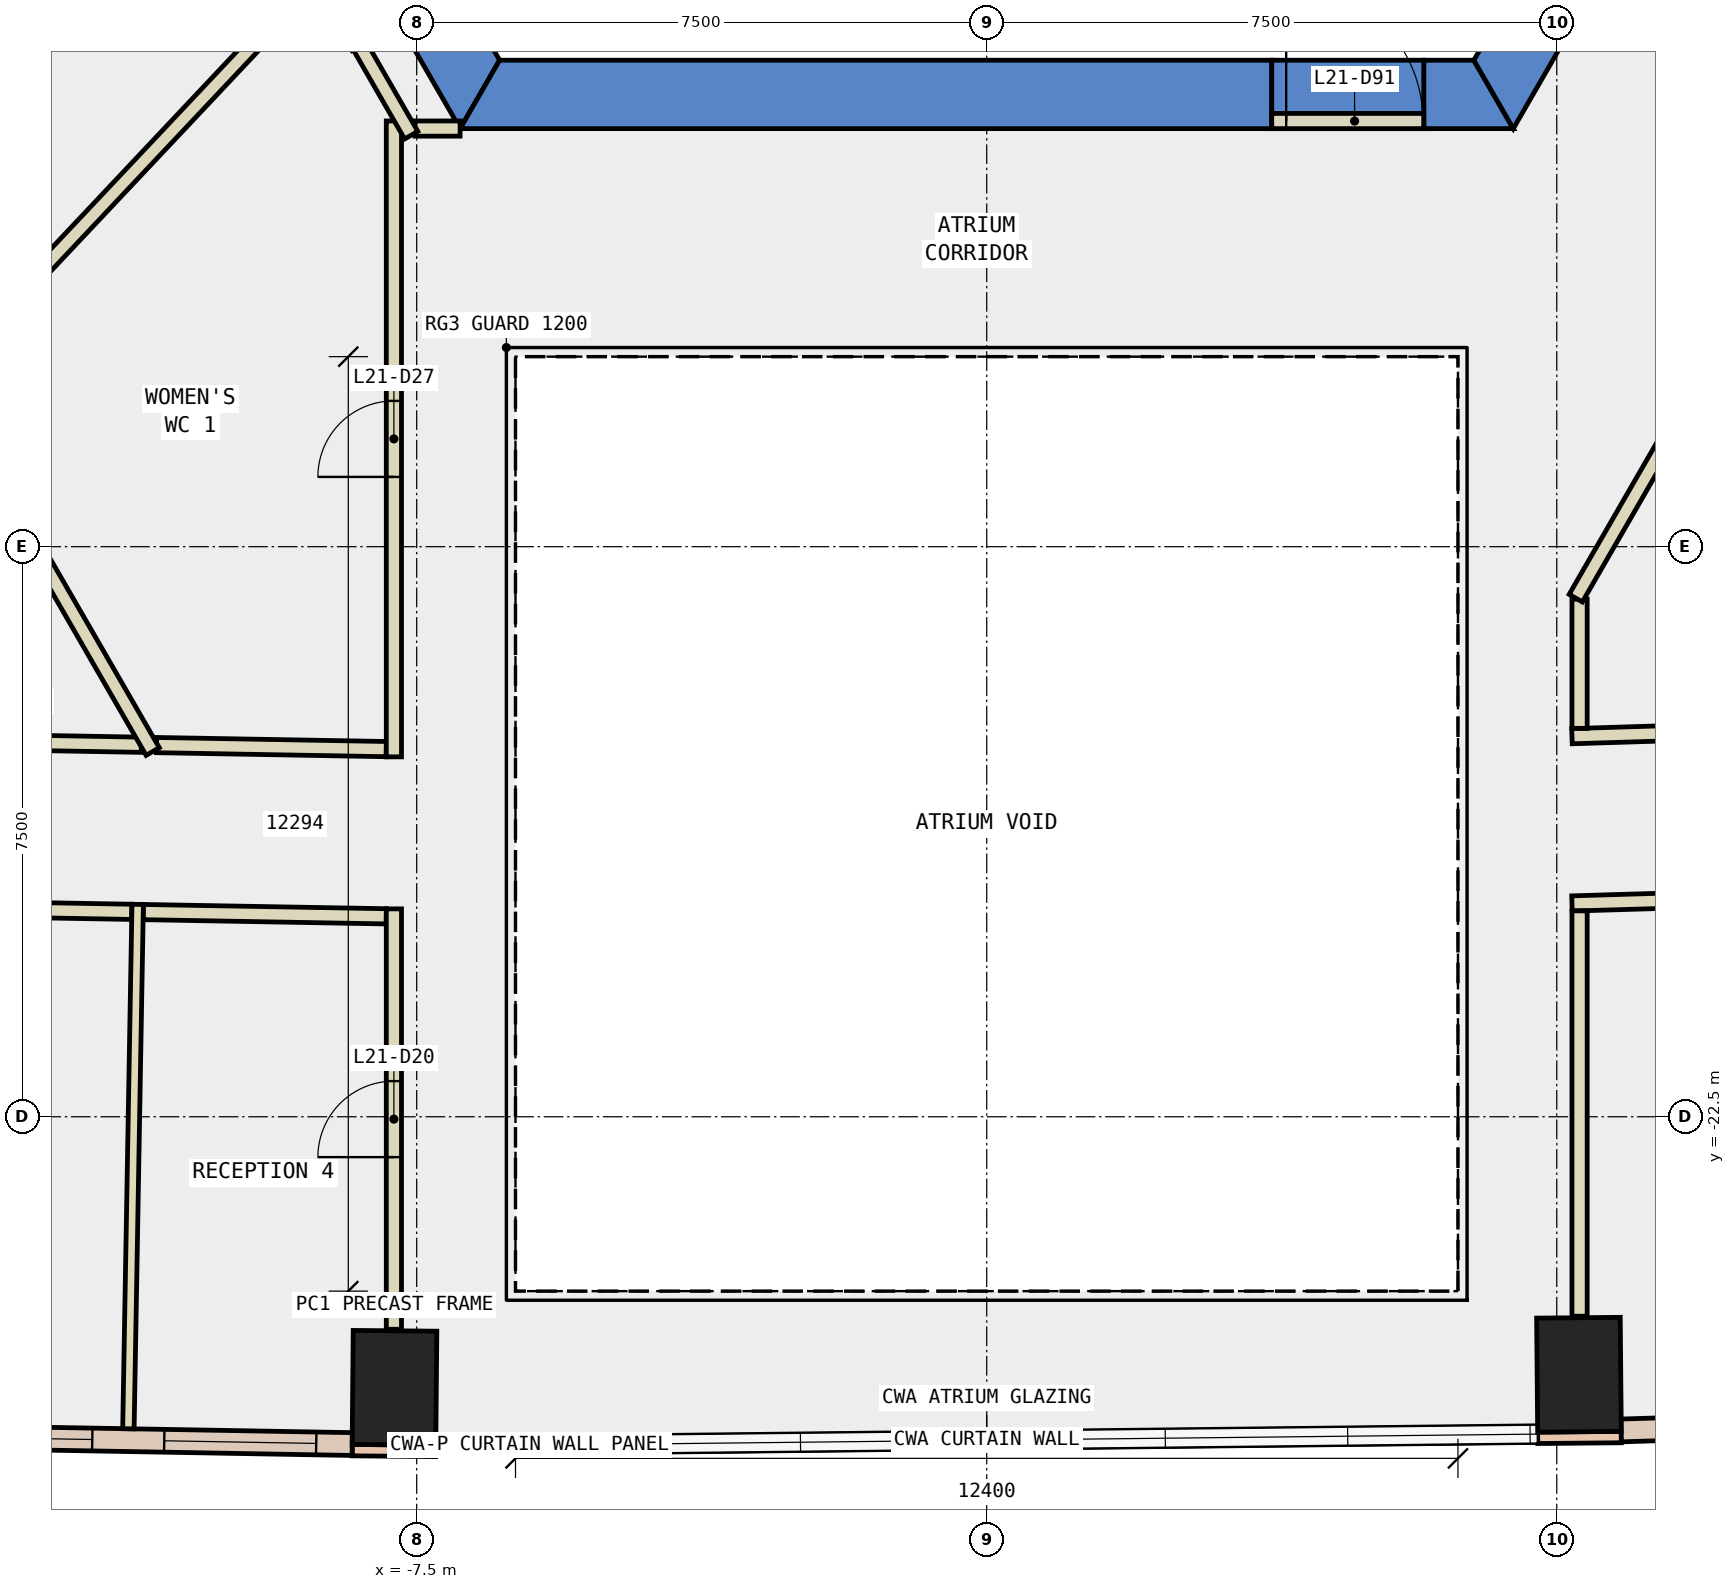
"""IFC4 building model, lengths in metres.
Left out: names, types, materials, properties, quantities, classifications, styles, units other than length and angle.
Written with IfcOpenShell. Run it as: python <this file> out.ifc"""

import sys

from ifc_helpers import new_model, si_unit, direction, frame, frame_2d, origin, origin_2d, place, context, subcontext, project, spatial, polyline, rectangle, outline, extrude, element, fill, save


model = new_model("IFC4")
c1 = context("Model", 3, precision=1e-05, world=origin(), true_north=direction((0.0, 1.0)))
c2 = subcontext(c1, "Body", "Model", "MODEL_VIEW")
j1 = project(units=[si_unit("LENGTHUNIT", "METRE"), si_unit("PLANEANGLEUNIT", "RADIAN")], contexts=[c1])
p1 = place(None, origin())
s1 = spatial("IfcSite", under=j1, at=p1, CompositionType="ELEMENT")
p2 = place(p1, origin())
s2 = spatial("IfcBuilding", under=s1, at=p2, CompositionType="ELEMENT")
p3 = place(p2, frame((0.0, 0.0, 99.2)))
s3 = spatial("IfcBuildingStorey", under=s2, at=p3, CompositionType="ELEMENT", Elevation=99.2)
for number, where, z_axis, x_axis in (
    (1, (-7.792, -26.066, -0.4), (0.0, 0.0, 1.0), (-1.0, 0.009, 0.0)),
    (2, (7.792, -25.894, -0.4), (0.0, 0.0, 1.0), (1.0, 0.009, 0.0)),
):
    element("IfcColumn", number, at=place(p3, frame(where, z_axis=z_axis, x_axis=x_axis)), inside=s3, PredefinedType="COLUMN", context=c2, shape_type="SweptSolid", body=[
        extrude(rectangle(XDim=1.1, YDim=1.5, at=origin_2d()), origin(), (0.0, 0.0, 1.0), 4.2),
    ])
p4 = place(p3, frame((0.0, 0.0, -0.4)))
e3 = element("IfcWall", 3, at=p4, inside=s3, PredefinedType="SHEAR", context=c2, shape_type="SweptSolid", body=[
    extrude(outline(polyline([(-13.856, 2.5), (-6.928, -9.5), (-6.409, -8.6), (-12.817, 2.5), (-13.856, 2.5)])), origin(), (0.0, 0.0, 1.0), 4.2),
])
p5 = place(p3, frame((0.0, 0.0, -0.4)))
e4 = element("IfcWall", 4, at=p5, inside=s3, PredefinedType="SHEAR", context=c2, shape_type="SweptSolid", body=[
    extrude(outline(polyline([(3.75, -9.5), (3.75, -8.6), (-6.409, -8.6), (-6.928, -9.5), (3.75, -9.5)])), origin(), (0.0, 0.0, 1.0), 4.2),
])
p6 = place(p3, frame((0.0, 0.0, -0.4)))
e5 = element("IfcWall", 5, at=p6, inside=s3, PredefinedType="SHEAR", context=c2, shape_type="SweptSolid", body=[
    extrude(outline(polyline([(5.75, -8.6), (5.75, -9.5), (6.928, -9.5), (6.409, -8.6), (5.75, -8.6)])), origin(), (0.0, 0.0, 1.0), 4.2),
])
p7 = place(p3, frame((0.0, 0.0, 3.6)))
e6 = element("IfcWall", 6, at=p7, inside=s3, PredefinedType="SHEAR", context=c2, shape_type="SweptSolid", body=[
    extrude(outline(polyline([(5.75, -9.5), (5.75, -8.6), (3.75, -8.6), (3.75, -9.5), (5.75, -9.5)])), origin(), (0.0, 0.0, 1.0), 0.2),
])
p8 = place(p3, frame((0.0, 0.0, -0.4)))
e7 = element("IfcWall", 7, at=p8, inside=s3, PredefinedType="SHEAR", context=c2, shape_type="SweptSolid", body=[
    extrude(outline(polyline([(8.117, -7.44), (7.338, -6.99), (6.409, -8.6), (6.928, -9.5), (8.117, -7.44)])), origin(), (0.0, 0.0, 1.0), 4.2),
])
p9 = place(p3, frame((-9.31, -5.375, -0.4), z_axis=(0.0, 0.0, 1.0), x_axis=(-0.866017533419, -0.500013631625, 0.0)))
e8 = element("IfcWall", 8, at=p9, inside=s3, PredefinedType="SHEAR", context=c2, shape_type="SweptSolid", body=[
    extrude(rectangle(XDim=9.0, YDim=0.8, at=frame_2d((4.5, 0.0))), origin(), (0.0, 0.0, 1.0), 4.2),
])
for number, where, z_axis, x_axis in (
    (9, (-8.349, -26.886, 0.0), (0.0, 0.0, 1.0), (1.0, -0.009, 0.0)),
    (10, (7.249, -26.724, 0.0), (0.0, 0.0, 1.0), (1.0, 0.009, 0.0)),
):
    element("IfcWall", number, at=place(p3, frame(where, z_axis=z_axis, x_axis=x_axis)), inside=s3, PredefinedType="STANDARD", context=c2, shape_type="SweptSolid", body=[
        extrude(rectangle(XDim=1.1, YDim=0.15, at=frame_2d((0.55, 0.0))), origin(), (0.0, 0.0, 1.0), 3.8),
    ])
p10 = place(p3, frame((-14.242, -26.703, 0.0), z_axis=(0.0, 0.0, 1.0), x_axis=(0.999847261365, -0.017477240672, 0.0)))
e11 = element("IfcWall", 11, at=p10, inside=s3, PredefinedType="STANDARD", context=c2, shape_type="SweptSolid", body=[
    extrude(rectangle(XDim=5.895, YDim=0.3, at=frame_2d((2.948, 0.0))), origin(), (0.0, 0.0, 1.0), 3.8),
])
p11 = place(p10, frame((0.474, 0.0, 0.9)))
e12 = element("IfcOpeningElement", 12, at=p11, cuts=e11, PredefinedType="OPENING", context=c2, shape_type="SweptSolid", body=[
    extrude(rectangle(XDim=2.0, YDim=2.6, at=frame_2d((1.0, 1.3))), frame((0.0, 0.16, 0.0), z_axis=(0.0, -1.0, 0.0), x_axis=(1.0, 0.0, 0.0)), (0.0, 0.0, 1.0), 0.32),
])
p12 = place(p10, frame((3.421, 0.0, 0.9)))
e13 = element("IfcOpeningElement", 13, at=p12, cuts=e11, PredefinedType="OPENING", context=c2, shape_type="SweptSolid", body=[
    extrude(rectangle(XDim=2.0, YDim=2.6, at=frame_2d((1.0, 1.3))), frame((0.0, 0.16, 0.0), z_axis=(0.0, -1.0, 0.0), x_axis=(1.0, 0.0, 0.0)), (0.0, 0.0, 1.0), 0.32),
])
p13 = place(p3, frame((8.347, -26.627, 0.0), z_axis=(0.0, 0.0, 1.0), x_axis=(0.999529601824, 0.030668796478, 0.0)))
e14 = element("IfcWall", 14, at=p13, inside=s3, PredefinedType="STANDARD", context=c2, shape_type="SweptSolid", body=[
    extrude(rectangle(XDim=5.899, YDim=0.3, at=frame_2d((2.949, 0.0))), origin(), (0.0, 0.0, 1.0), 3.8),
])
p14 = place(p13, frame((0.475, 0.0, 0.9)))
e15 = element("IfcOpeningElement", 15, at=p14, cuts=e14, PredefinedType="OPENING", context=c2, shape_type="SweptSolid", body=[
    extrude(rectangle(XDim=2.0, YDim=2.6, at=frame_2d((1.0, 1.3))), frame((0.0, 0.16, 0.0), z_axis=(0.0, -1.0, 0.0), x_axis=(1.0, 0.0, 0.0)), (0.0, 0.0, 1.0), 0.32),
])
p15 = place(p13, frame((3.424, 0.0, 0.9)))
e16 = element("IfcOpeningElement", 16, at=p15, cuts=e14, PredefinedType="OPENING", context=c2, shape_type="SweptSolid", body=[
    extrude(rectangle(XDim=2.0, YDim=2.6, at=frame_2d((1.0, 1.3))), frame((0.0, 0.16, 0.0), z_axis=(0.0, -1.0, 0.0), x_axis=(1.0, 0.0, 0.0)), (0.0, 0.0, 1.0), 0.32),
])
p16 = place(p3, frame((7.7, -17.493, 0.0), z_axis=(0.0, 0.0, 1.0), x_axis=(0.999526319751, 0.030775576778, 0.0)))
e17 = element("IfcWall", 17, at=p16, inside=s3, PredefinedType="PARTITIONING", context=c2, shape_type="SweptSolid", body=[
    extrude(rectangle(XDim=6.822, YDim=0.2, at=frame_2d((3.411, 0.0))), origin(), (0.0, 0.0, 1.0), 3.8),
])
p17 = place(p16, frame((2.911, 0.0, 0.0)))
e18 = element("IfcOpeningElement", 18, at=p17, cuts=e17, PredefinedType="OPENING", context=c2, shape_type="SweptSolid", body=[
    extrude(rectangle(XDim=1.0, YDim=2.1, at=frame_2d((0.5, 1.05))), frame((0.0, 0.11, 0.0), z_axis=(0.0, -1.0, 0.0), x_axis=(1.0, 0.0, 0.0)), (0.0, 0.0, 1.0), 0.22),
])
p18 = place(p3, frame((-10.923, -17.61, 0.0), z_axis=(0.0, 0.0, 1.0), x_axis=(0.999846489632, -0.017521334753, 0.0)))
e19 = element("IfcWall", 19, at=p18, inside=s3, PredefinedType="PARTITIONING", context=c2, shape_type="SweptSolid", body=[
    extrude(rectangle(XDim=3.024, YDim=0.2, at=frame_2d((1.512, 0.0))), origin(), (0.0, 0.0, 1.0), 3.8),
])
p19 = place(p3, frame((-14.58, -17.545, 0.0), z_axis=(0.0, 0.0, 1.0), x_axis=(0.999844180431, -0.01765261618, 0.0)))
e20 = element("IfcWall", 20, at=p19, inside=s3, PredefinedType="PARTITIONING", context=c2, shape_type="SweptSolid", body=[
    extrude(rectangle(XDim=3.458, YDim=0.2, at=frame_2d((1.729, 0.0))), origin(), (0.0, 0.0, 1.0), 3.8),
])
p20 = place(p19, frame((1.229, 0.0, 0.0)))
e21 = element("IfcOpeningElement", 21, at=p20, cuts=e20, PredefinedType="OPENING", context=c2, shape_type="SweptSolid", body=[
    extrude(rectangle(XDim=1.0, YDim=2.1, at=frame_2d((0.5, 1.05))), frame((0.0, 0.11, 0.0), z_axis=(0.0, -1.0, 0.0), x_axis=(1.0, 0.0, 0.0)), (0.0, 0.0, 1.0), 0.22),
])
p21 = place(p3, frame((21.621, -19.28, 0.0), z_axis=(0.0, 0.0, 1.0), x_axis=(-0.999557957525, -0.029730280001, 0.0)))
e22 = element("IfcWall", 22, at=p21, inside=s3, PredefinedType="PARTITIONING", context=c2, shape_type="SweptSolid", body=[
    extrude(rectangle(XDim=13.927, YDim=0.2, at=frame_2d((6.964, 0.0))), origin(), (0.0, 0.0, 1.0), 3.8),
])
p22 = place(p21, frame((6.464, 0.0, 0.0)))
e23 = element("IfcOpeningElement", 23, at=p22, cuts=e22, PredefinedType="OPENING", context=c2, shape_type="SweptSolid", body=[
    extrude(rectangle(XDim=1.0, YDim=2.1, at=frame_2d((0.5, 1.05))), frame((0.0, 0.11, 0.0), z_axis=(0.0, -1.0, 0.0), x_axis=(1.0, 0.0, 0.0)), (0.0, 0.0, 1.0), 0.22),
])
p23 = place(p3, frame((-11.248, -19.804, 0.0), z_axis=(0.0, 0.0, 1.0), x_axis=(-0.999848794654, 0.017389302123, 0.0)))
e24 = element("IfcWall", 24, at=p23, inside=s3, PredefinedType="PARTITIONING", context=c2, shape_type="SweptSolid", body=[
    extrude(rectangle(XDim=3.384, YDim=0.2, at=frame_2d((1.692, 0.0))), origin(), (0.0, 0.0, 1.0), 3.8),
])
p24 = place(p3, frame((-7.9, -19.863, 0.0), z_axis=(0.0, 0.0, 1.0), x_axis=(-0.999845883554, 0.017555886191, 0.0)))
e25 = element("IfcWall", 25, at=p24, inside=s3, PredefinedType="PARTITIONING", context=c2, shape_type="SweptSolid", body=[
    extrude(rectangle(XDim=3.198, YDim=0.2, at=frame_2d((1.599, 0.0))), origin(), (0.0, 0.0, 1.0), 3.8),
])
p25 = place(p3, frame((7.8, -15.69, 0.0), z_axis=(0.0, 0.0, 1.0), x_axis=(0.0, -1.0, 0.0)))
e26 = element("IfcWall", 26, at=p25, inside=s3, PredefinedType="PARTITIONING", context=c2, shape_type="SweptSolid", body=[
    extrude(rectangle(XDim=1.7, YDim=0.2, at=frame_2d((0.85, 0.0))), origin(), (0.0, 0.0, 1.0), 3.8),
])
p26 = place(p3, frame((-7.522, -9.499, 0.0), z_axis=(0.0, 0.0, 1.0), x_axis=(1.0, 0.0, 0.0)))
e27 = element("IfcWall", 27, at=p26, inside=s3, PredefinedType="PARTITIONING", context=c2, shape_type="SweptSolid", body=[
    extrude(rectangle(XDim=0.593, YDim=0.2, at=frame_2d((0.296, 0.0))), origin(), (0.0, 0.0, 1.0), 3.8),
])
p27 = place(p3, frame((-7.8, -17.765, 0.0), z_axis=(0.0, 0.0, 1.0), x_axis=(0.0, 1.0, 0.0)))
e28 = element("IfcWall", 28, at=p27, inside=s3, PredefinedType="PARTITIONING", context=c2, shape_type="SweptSolid", body=[
    extrude(rectangle(XDim=8.366, YDim=0.2, at=frame_2d((4.183, 0.0))), origin(), (0.0, 0.0, 1.0), 3.8),
])
p28 = place(p27, frame((3.683, 0.0, 0.0)))
e29 = element("IfcOpeningElement", 29, at=p28, cuts=e28, PredefinedType="OPENING", context=c2, shape_type="SweptSolid", body=[
    extrude(rectangle(XDim=1.0, YDim=2.1, at=frame_2d((0.5, 1.05))), frame((0.0, 0.11, 0.0), z_axis=(0.0, -1.0, 0.0), x_axis=(1.0, 0.0, 0.0)), (0.0, 0.0, 1.0), 0.22),
])
p29 = place(p3, frame((7.8, -19.791, 0.0), z_axis=(0.0, 0.0, 1.0), x_axis=(0.0, -1.0, 0.0)))
e30 = element("IfcWall", 30, at=p29, inside=s3, PredefinedType="PARTITIONING", context=c2, shape_type="SweptSolid", body=[
    extrude(rectangle(XDim=5.333, YDim=0.2, at=frame_2d((2.667, 0.0))), origin(), (0.0, 0.0, 1.0), 3.8),
])
p30 = place(p3, frame((-7.8, -25.296, 0.0), z_axis=(0.0, 0.0, 1.0), x_axis=(0.0, 1.0, 0.0)))
e31 = element("IfcWall", 31, at=p30, inside=s3, PredefinedType="PARTITIONING", context=c2, shape_type="SweptSolid", body=[
    extrude(rectangle(XDim=5.531, YDim=0.2, at=frame_2d((2.766, 0.0))), origin(), (0.0, 0.0, 1.0), 3.8),
])
p31 = place(p30, frame((2.265, 0.0, 0.0)))
e32 = element("IfcOpeningElement", 32, at=p31, cuts=e31, PredefinedType="OPENING", context=c2, shape_type="SweptSolid", body=[
    extrude(rectangle(XDim=1.0, YDim=2.1, at=frame_2d((0.5, 1.05))), frame((0.0, 0.11, 0.0), z_axis=(0.0, -1.0, 0.0), x_axis=(1.0, 0.0, 0.0)), (0.0, 0.0, 1.0), 0.22),
])
p32 = place(p3, frame((12.401, -7.621, 0.0), z_axis=(0.0, 0.0, 1.0), x_axis=(-0.499983724212, -0.866034800411, 0.0)))
e33 = element("IfcWall", 33, at=p32, inside=s3, PredefinedType="PARTITIONING", context=c2, shape_type="SweptSolid", body=[
    extrude(rectangle(XDim=9.302, YDim=0.2, at=frame_2d((4.651, 0.0))), origin(), (0.0, 0.0, 1.0), 3.8),
])
p33 = place(p3, frame((-7.572, -9.586, 0.0), z_axis=(0.0, 0.0, 1.0), x_axis=(-0.499484152563, 0.866323023669, 0.0)))
e34 = element("IfcWall", 34, at=p33, inside=s3, PredefinedType="PARTITIONING", context=c2, shape_type="SweptSolid", body=[
    extrude(rectangle(XDim=1.39, YDim=0.2, at=frame_2d((0.695, 0.0))), origin(), (0.0, 0.0, 1.0), 3.8),
])
p34 = place(p3, frame((-13.865, -12.876, 0.0), z_axis=(0.0, 0.0, 1.0), x_axis=(0.685651384846, 0.727930064263, 0.0)))
e35 = element("IfcWall", 35, at=p34, inside=s3, PredefinedType="PARTITIONING", context=c2, shape_type="SweptSolid", body=[
    extrude(rectangle(XDim=7.091, YDim=0.2, at=frame_2d((3.545, 0.0))), origin(), (0.0, 0.0, 1.0), 3.8),
])
p35 = place(p3, frame((-10.973, -17.695, 0.0), z_axis=(0.0, 0.0, 1.0), x_axis=(-0.499986535608, 0.866033177315, 0.0)))
e36 = element("IfcWall", 36, at=p35, inside=s3, PredefinedType="PARTITIONING", context=c2, shape_type="SweptSolid", body=[
    extrude(rectangle(XDim=5.549, YDim=0.2, at=frame_2d((2.774, 0.0))), origin(), (0.0, 0.0, 1.0), 3.8),
])
p36 = place(p3, frame((-11.171, -19.706, 0.0), z_axis=(0.0, 0.0, 1.0), x_axis=(-0.017691335128, -0.999843496084, 0.0)))
e37 = element("IfcWall", 37, at=p36, inside=s3, PredefinedType="PARTITIONING", context=c2, shape_type="SweptSolid", body=[
    extrude(rectangle(XDim=6.9, YDim=0.15, at=frame_2d((3.45, 0.0))), origin(), (0.0, 0.0, 1.0), 3.8),
])
p37 = place(p3, frame((3.75, -9.4, 0.0), z_axis=(0.0, 0.0, 1.0), x_axis=(1.0, 0.0, 0.0)))
e38 = element("IfcWall", 38, at=p37, inside=s3, PredefinedType="PARTITIONING", context=c2, shape_type="SweptSolid", body=[
    extrude(rectangle(XDim=2.0, YDim=0.2, at=frame_2d((1.0, 0.0))), origin(), (0.0, 0.0, 1.0), 2.4),
])
p38 = place(p37, frame((0.19, 0.0, 0.0)))
e39 = element("IfcOpeningElement", 39, at=p38, cuts=e38, PredefinedType="OPENING", context=c2, shape_type="SweptSolid", body=[
    extrude(rectangle(XDim=1.8, YDim=2.1, at=frame_2d((0.9, 1.05))), frame((0.0, 0.11, 0.0), z_axis=(0.0, -1.0, 0.0), x_axis=(1.0, 0.0, 0.0)), (0.0, 0.0, 1.0), 0.22),
])
p39 = place(p11, origin())
e40 = element("IfcWindow", 40, at=p39, inside=s3, PartitioningType="SINGLE_PANEL", PredefinedType="WINDOW", context=c2, shape_type="SweptSolid", body=[
    extrude(rectangle(XDim=2.0, YDim=2.6, at=frame_2d((1.0, 1.3))), frame((0.0, 0.03, 0.0), z_axis=(0.0, -1.0, 0.0), x_axis=(1.0, 0.0, 0.0)), (0.0, 0.0, 1.0), 0.06),
])
fill(e12, e40)
p40 = place(p12, origin())
e41 = element("IfcWindow", 41, at=p40, inside=s3, PartitioningType="SINGLE_PANEL", PredefinedType="WINDOW", context=c2, shape_type="SweptSolid", body=[
    extrude(rectangle(XDim=2.0, YDim=2.6, at=frame_2d((1.0, 1.3))), frame((0.0, 0.03, 0.0), z_axis=(0.0, -1.0, 0.0), x_axis=(1.0, 0.0, 0.0)), (0.0, 0.0, 1.0), 0.06),
])
fill(e13, e41)
p41 = place(p31, origin())
e42 = element("IfcDoor", 42, at=p41, inside=s3, OperationType="SINGLE_SWING_LEFT", PredefinedType="DOOR", context=c2, shape_type="SweptSolid", body=[
    extrude(rectangle(XDim=1.0, YDim=2.1, at=frame_2d((0.5, 1.05))), frame((0.0, 0.025, 0.0), z_axis=(0.0, -1.0, 0.0), x_axis=(1.0, 0.0, 0.0)), (0.0, 0.0, 1.0), 0.05),
])
fill(e32, e42)
p42 = place(p28, origin())
e43 = element("IfcDoor", 43, at=p42, inside=s3, OperationType="SINGLE_SWING_RIGHT", PredefinedType="DOOR", context=c2, shape_type="SweptSolid", body=[
    extrude(rectangle(XDim=1.0, YDim=2.1, at=frame_2d((0.5, 1.05))), frame((0.0, 0.025, 0.0), z_axis=(0.0, -1.0, 0.0), x_axis=(1.0, 0.0, 0.0)), (0.0, 0.0, 1.0), 0.05),
])
fill(e29, e43)
p43 = place(p38, origin())
e44 = element("IfcDoor", 44, at=p43, inside=s3, OperationType="DOUBLE_DOOR_SINGLE_SWING", PredefinedType="DOOR", context=c2, shape_type="SweptSolid", body=[
    extrude(rectangle(XDim=1.8, YDim=2.1, at=frame_2d((0.9, 1.05))), frame((0.0, 0.025, 0.0), z_axis=(0.0, -1.0, 0.0), x_axis=(1.0, 0.0, 0.0)), (0.0, 0.0, 1.0), 0.05),
])
fill(e39, e44)
save(model, sys.argv[1])
